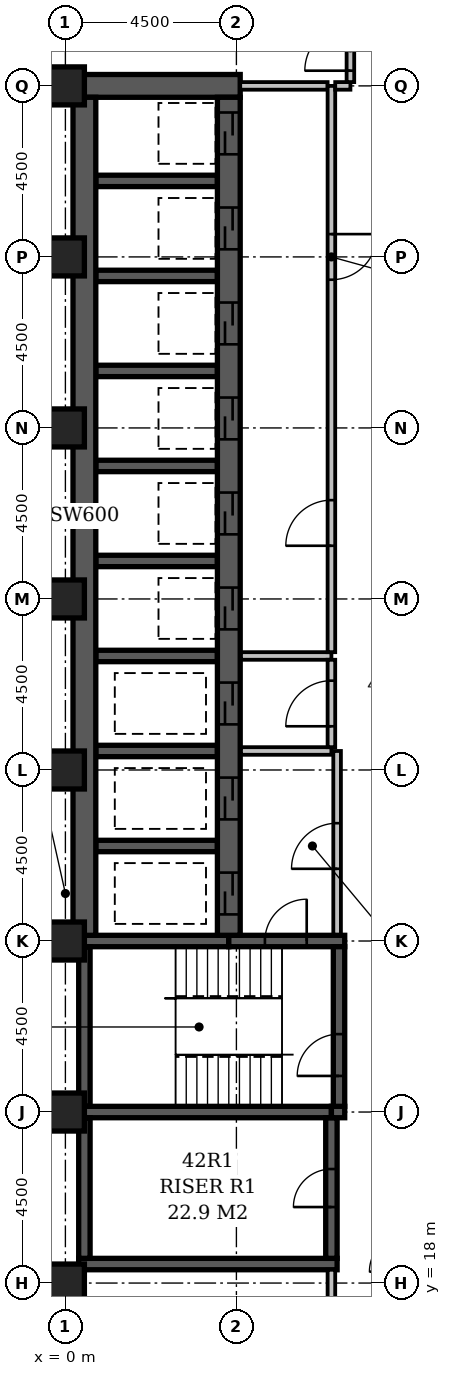
"""IFC4 building model, lengths in metres.
Left out: names, types, materials, properties, quantities, classifications, styles, units other than length and angle.
Written with IfcOpenShell. Run it as: python <this file> out.ifc"""

import sys

from ifc_helpers import new_model, si_unit, direction, frame, frame_2d, origin, origin_2d, place, context, subcontext, project, spatial, rectangle, extrude, element, fill, save


model = new_model("IFC4")
c1 = context("Model", 3, precision=1e-05, world=origin(), true_north=direction((0.0, 1.0)))
c2 = subcontext(c1, "Body", "Model", "MODEL_VIEW")
j1 = project(units=[si_unit("LENGTHUNIT", "METRE"), si_unit("PLANEANGLEUNIT", "RADIAN")], contexts=[c1])
p1 = place(None, origin())
s1 = spatial("IfcSite", under=j1, at=p1, CompositionType="ELEMENT")
p2 = place(p1, origin())
s2 = spatial("IfcBuilding", under=s1, at=p2, CompositionType="ELEMENT")
p3 = place(p2, frame((0.0, 0.0, 166.4)))
s3 = spatial("IfcBuildingStorey", under=s2, at=p3, CompositionType="ELEMENT", Elevation=166.4)
p4 = place(p3, frame((0.2, 49.5, -0.3), z_axis=(0.0, 0.0, 1.0), x_axis=(1.0, 0.0, 0.0)))
e1 = element("IfcWall", 1, at=p4, inside=s3, PredefinedType="SHEAR", context=c2, shape_type="SweptSolid", body=[
    extrude(rectangle(XDim=4.4, YDim=0.6, at=frame_2d((2.2, 0.0))), origin(), (0.0, 0.0, 1.0), 3.6),
])
p5 = place(p3, frame((0.35, 18.5, -0.3), z_axis=(0.0, 0.0, 1.0), x_axis=(1.0, 0.0, 0.0)))
e2 = element("IfcWall", 2, at=p5, inside=s3, PredefinedType="SHEAR", context=c2, shape_type="SweptSolid", body=[
    extrude(rectangle(XDim=6.8, YDim=0.3, at=frame_2d((3.4, 0.0))), origin(), (0.0, 0.0, 1.0), 3.6),
])
p6 = place(p3, frame((0.35, 22.5, -0.3), z_axis=(0.0, 0.0, 1.0), x_axis=(1.0, 0.0, 0.0)))
e3 = element("IfcWall", 3, at=p6, inside=s3, PredefinedType="SHEAR", context=c2, shape_type="SweptSolid", body=[
    extrude(rectangle(XDim=6.65, YDim=0.3, at=frame_2d((3.325, 0.0))), origin(), (0.0, 0.0, 1.0), 3.6),
])
p7 = place(p3, frame((0.35, 27.0, -0.3), z_axis=(0.0, 0.0, 1.0), x_axis=(1.0, 0.0, 0.0)))
e4 = element("IfcWall", 4, at=p7, inside=s3, PredefinedType="SHEAR", context=c2, shape_type="SweptSolid", body=[
    extrude(rectangle(XDim=3.95, YDim=0.3, at=frame_2d((1.975, 0.0))), origin(), (0.0, 0.0, 1.0), 3.6),
])
p8 = place(p3, frame((0.5, 18.65, -0.3), z_axis=(0.0, 0.0, 1.0), x_axis=(0.0, 1.0, 0.0)))
e5 = element("IfcWall", 5, at=p8, inside=s3, PredefinedType="SHEAR", context=c2, shape_type="SweptSolid", body=[
    extrude(rectangle(XDim=3.7, YDim=0.3, at=frame_2d((1.85, 0.0))), origin(), (0.0, 0.0, 1.0), 3.6),
])
p9 = place(p3, frame((0.5, 22.65, -0.3), z_axis=(0.0, 0.0, 1.0), x_axis=(0.0, 1.0, 0.0)))
e6 = element("IfcWall", 6, at=p9, inside=s3, PredefinedType="SHEAR", context=c2, shape_type="SweptSolid", body=[
    extrude(rectangle(XDim=4.2, YDim=0.3, at=frame_2d((2.1, 0.0))), origin(), (0.0, 0.0, 1.0), 3.6),
])
p10 = place(p3, frame((0.5, 27.15, -0.3), z_axis=(0.0, 0.0, 1.0), x_axis=(0.0, 1.0, 0.0)))
e7 = element("IfcWall", 7, at=p10, inside=s3, PredefinedType="SHEAR", context=c2, shape_type="SweptSolid", body=[
    extrude(rectangle(XDim=22.05, YDim=0.6, at=frame_2d((11.025, 0.0))), origin(), (0.0, 0.0, 1.0), 3.6),
])
for number, where, z_axis, x_axis in (
    (8, (0.8, 29.5, -0.3), (0.0, 0.0, 1.0), (1.0, 0.0, 0.0)),
    (9, (0.8, 32.0, -0.3), (0.0, 0.0, 1.0), (1.0, 0.0, 0.0)),
    (10, (0.8, 34.5, -0.3), (0.0, 0.0, 1.0), (1.0, 0.0, 0.0)),
    (11, (0.8, 37.0, -0.3), (0.0, 0.0, 1.0), (1.0, 0.0, 0.0)),
    (12, (0.8, 39.5, -0.3), (0.0, 0.0, 1.0), (1.0, 0.0, 0.0)),
    (13, (0.8, 42.0, -0.3), (0.0, 0.0, 1.0), (1.0, 0.0, 0.0)),
    (14, (0.8, 44.5, -0.3), (0.0, 0.0, 1.0), (1.0, 0.0, 0.0)),
    (15, (0.8, 47.0, -0.3), (0.0, 0.0, 1.0), (1.0, 0.0, 0.0)),
):
    element("IfcWall", number, at=place(p3, frame(where, z_axis=z_axis, x_axis=x_axis)), inside=s3, PredefinedType="SHEAR", context=c2, shape_type="SweptSolid", body=[
        extrude(rectangle(XDim=3.2, YDim=0.3, at=frame_2d((1.6, 0.0))), origin(), (0.0, 0.0, 1.0), 3.6),
    ])
p11 = place(p3, frame((4.3, 27.0, -0.3), z_axis=(0.0, 0.0, 1.0), x_axis=(1.0, 0.0, 0.0)))
e16 = element("IfcWall", 16, at=p11, inside=s3, PredefinedType="SHEAR", context=c2, shape_type="SweptSolid", body=[
    extrude(rectangle(XDim=3.05, YDim=0.3, at=frame_2d((1.525, 0.0))), origin(), (0.0, 0.0, 1.0), 3.6),
])
p12 = place(p11, frame((0.95, 0.0, 0.3)))
e17 = element("IfcOpeningElement", 17, at=p12, cuts=e16, PredefinedType="OPENING", context=c2, shape_type="SweptSolid", body=[
    extrude(rectangle(XDim=1.1, YDim=2.1, at=frame_2d((0.55, 1.05))), frame((0.0, 0.162, 0.0), z_axis=(0.0, -1.0, 0.0), x_axis=(1.0, 0.0, 0.0)), (0.0, 0.0, 1.0), 0.324),
])
p13 = place(p3, frame((4.3, 27.15, -0.3), z_axis=(0.0, 0.0, 1.0), x_axis=(0.0, 1.0, 0.0)))
e18 = element("IfcWall", 18, at=p13, inside=s3, PredefinedType="SHEAR", context=c2, shape_type="SweptSolid", body=[
    extrude(rectangle(XDim=22.05, YDim=0.6, at=frame_2d((11.025, 0.0))), origin(), (0.0, 0.0, 1.0), 3.6),
])
p14 = place(p13, frame((3.05, 0.0, 0.3)))
e19 = element("IfcOpeningElement", 19, at=p14, cuts=e18, PredefinedType="OPENING", context=c2, shape_type="SweptSolid", body=[
    extrude(rectangle(XDim=1.1, YDim=2.1, at=frame_2d((0.55, 1.05))), frame((0.0, 0.312, 0.0), z_axis=(0.0, -1.0, 0.0), x_axis=(1.0, 0.0, 0.0)), (0.0, 0.0, 1.0), 0.624),
])
p15 = place(p13, frame((0.55, 0.0, 0.3)))
e20 = element("IfcOpeningElement", 20, at=p15, cuts=e18, PredefinedType="OPENING", context=c2, shape_type="SweptSolid", body=[
    extrude(rectangle(XDim=1.1, YDim=2.1, at=frame_2d((0.55, 1.05))), frame((0.0, 0.312, 0.0), z_axis=(0.0, -1.0, 0.0), x_axis=(1.0, 0.0, 0.0)), (0.0, 0.0, 1.0), 0.624),
])
p16 = place(p13, frame((20.55, 0.0, 0.3)))
e21 = element("IfcOpeningElement", 21, at=p16, cuts=e18, PredefinedType="OPENING", context=c2, shape_type="SweptSolid", body=[
    extrude(rectangle(XDim=1.1, YDim=2.1, at=frame_2d((0.55, 1.05))), frame((0.0, 0.312, 0.0), z_axis=(0.0, -1.0, 0.0), x_axis=(1.0, 0.0, 0.0)), (0.0, 0.0, 1.0), 0.624),
])
p17 = place(p13, frame((18.05, 0.0, 0.3)))
e22 = element("IfcOpeningElement", 22, at=p17, cuts=e18, PredefinedType="OPENING", context=c2, shape_type="SweptSolid", body=[
    extrude(rectangle(XDim=1.1, YDim=2.1, at=frame_2d((0.55, 1.05))), frame((0.0, 0.312, 0.0), z_axis=(0.0, -1.0, 0.0), x_axis=(1.0, 0.0, 0.0)), (0.0, 0.0, 1.0), 0.624),
])
p18 = place(p13, frame((15.55, 0.0, 0.3)))
e23 = element("IfcOpeningElement", 23, at=p18, cuts=e18, PredefinedType="OPENING", context=c2, shape_type="SweptSolid", body=[
    extrude(rectangle(XDim=1.1, YDim=2.1, at=frame_2d((0.55, 1.05))), frame((0.0, 0.312, 0.0), z_axis=(0.0, -1.0, 0.0), x_axis=(1.0, 0.0, 0.0)), (0.0, 0.0, 1.0), 0.624),
])
p19 = place(p13, frame((13.05, 0.0, 0.3)))
e24 = element("IfcOpeningElement", 24, at=p19, cuts=e18, PredefinedType="OPENING", context=c2, shape_type="SweptSolid", body=[
    extrude(rectangle(XDim=1.1, YDim=2.1, at=frame_2d((0.55, 1.05))), frame((0.0, 0.312, 0.0), z_axis=(0.0, -1.0, 0.0), x_axis=(1.0, 0.0, 0.0)), (0.0, 0.0, 1.0), 0.624),
])
p20 = place(p13, frame((10.55, 0.0, 0.3)))
e25 = element("IfcOpeningElement", 25, at=p20, cuts=e18, PredefinedType="OPENING", context=c2, shape_type="SweptSolid", body=[
    extrude(rectangle(XDim=1.1, YDim=2.1, at=frame_2d((0.55, 1.05))), frame((0.0, 0.312, 0.0), z_axis=(0.0, -1.0, 0.0), x_axis=(1.0, 0.0, 0.0)), (0.0, 0.0, 1.0), 0.624),
])
p21 = place(p13, frame((8.05, 0.0, 0.3)))
e26 = element("IfcOpeningElement", 26, at=p21, cuts=e18, PredefinedType="OPENING", context=c2, shape_type="SweptSolid", body=[
    extrude(rectangle(XDim=1.1, YDim=2.1, at=frame_2d((0.55, 1.05))), frame((0.0, 0.312, 0.0), z_axis=(0.0, -1.0, 0.0), x_axis=(1.0, 0.0, 0.0)), (0.0, 0.0, 1.0), 0.624),
])
p22 = place(p13, frame((5.55, 0.0, 0.3)))
e27 = element("IfcOpeningElement", 27, at=p22, cuts=e18, PredefinedType="OPENING", context=c2, shape_type="SweptSolid", body=[
    extrude(rectangle(XDim=1.1, YDim=2.1, at=frame_2d((0.55, 1.05))), frame((0.0, 0.312, 0.0), z_axis=(0.0, -1.0, 0.0), x_axis=(1.0, 0.0, 0.0)), (0.0, 0.0, 1.0), 0.624),
])
p23 = place(p3, frame((7.0, 18.65, -0.3), z_axis=(0.0, 0.0, 1.0), x_axis=(0.0, 1.0, 0.0)))
e28 = element("IfcWall", 28, at=p23, inside=s3, PredefinedType="SHEAR", context=c2, shape_type="SweptSolid", body=[
    extrude(rectangle(XDim=3.7, YDim=0.3, at=frame_2d((1.85, 0.0))), origin(), (0.0, 0.0, 1.0), 3.6),
])
p24 = place(p23, frame((1.35, 0.0, 0.3)))
e29 = element("IfcOpeningElement", 29, at=p24, cuts=e28, PredefinedType="OPENING", context=c2, shape_type="SweptSolid", body=[
    extrude(rectangle(XDim=1.0, YDim=2.1, at=frame_2d((0.5, 1.05))), frame((0.0, 0.162, 0.0), z_axis=(0.0, -1.0, 0.0), x_axis=(1.0, 0.0, 0.0)), (0.0, 0.0, 1.0), 0.324),
])
p25 = place(p3, frame((7.0, 22.5, -0.3), z_axis=(0.0, 0.0, 1.0), x_axis=(1.0, 0.0, 0.0)))
e30 = element("IfcWall", 30, at=p25, inside=s3, PredefinedType="SHEAR", context=c2, shape_type="SweptSolid", body=[
    extrude(rectangle(XDim=0.35, YDim=0.3, at=frame_2d((0.175, 0.0))), origin(), (0.0, 0.0, 1.0), 3.6),
])
p26 = place(p3, frame((7.2, 22.65, -0.3), z_axis=(0.0, 0.0, 1.0), x_axis=(0.0, 1.0, 0.0)))
e31 = element("IfcWall", 31, at=p26, inside=s3, PredefinedType="SHEAR", context=c2, shape_type="SweptSolid", body=[
    extrude(rectangle(XDim=4.2, YDim=0.3, at=frame_2d((2.1, 0.0))), origin(), (0.0, 0.0, 1.0), 3.6),
])
p27 = place(p26, frame((0.8, 0.0, 0.3)))
e32 = element("IfcOpeningElement", 32, at=p27, cuts=e31, PredefinedType="OPENING", context=c2, shape_type="SweptSolid", body=[
    extrude(rectangle(XDim=1.1, YDim=2.1, at=frame_2d((0.55, 1.05))), frame((0.0, 0.162, 0.0), z_axis=(0.0, -1.0, 0.0), x_axis=(1.0, 0.0, 0.0)), (0.0, 0.0, 1.0), 0.324),
])
for number, where, z_axis, x_axis in (
    (33, (0.0, 18.0, -0.3), (0.0, 0.0, 1.0), (1.0, 0.0, 0.0)),
    (34, (0.0, 22.5, -0.3), (0.0, 0.0, 1.0), (1.0, 0.0, 0.0)),
    (35, (0.0, 27.0, -0.3), (0.0, 0.0, 1.0), (1.0, 0.0, 0.0)),
    (36, (0.0, 31.5, -0.3), (0.0, 0.0, 1.0), (1.0, 0.0, 0.0)),
    (37, (0.0, 36.0, -0.3), (0.0, 0.0, 1.0), (1.0, 0.0, 0.0)),
    (38, (0.0, 40.5, -0.3), (0.0, 0.0, 1.0), (1.0, 0.0, 0.0)),
    (39, (0.0, 45.0, -0.3), (0.0, 0.0, 1.0), (1.0, 0.0, 0.0)),
    (40, (0.0, 49.5, -0.3), (0.0, 0.0, 1.0), (1.0, 0.0, 0.0)),
):
    element("IfcColumn", number, at=place(p3, frame(where, z_axis=z_axis, x_axis=x_axis)), inside=s3, PredefinedType="COLUMN", context=c2, shape_type="SweptSolid", body=[
        extrude(rectangle(XDim=1.0, YDim=1.0, at=origin_2d()), origin(), (0.0, 0.0, 1.0), 3.6),
    ])
p28 = place(p3, frame((4.62, 34.5, 0.0), z_axis=(0.0, 0.0, 1.0), x_axis=(1.0, 0.0, 0.0)))
e41 = element("IfcWall", 41, at=p28, inside=s3, PredefinedType="PARTITIONING", context=c2, shape_type="SweptSolid", body=[
    extrude(rectangle(XDim=2.38, YDim=0.2, at=frame_2d((1.19, 0.0))), origin(), (0.0, 0.0, 1.0), 3.3),
])
p29 = place(p3, frame((7.0, 34.6, 0.0), z_axis=(0.0, 0.0, 1.0), x_axis=(0.0, 1.0, 0.0)))
e42 = element("IfcWall", 42, at=p29, inside=s3, PredefinedType="PARTITIONING", context=c2, shape_type="SweptSolid", body=[
    extrude(rectangle(XDim=14.9, YDim=0.2, at=frame_2d((7.45, 0.0))), origin(), (0.0, 0.0, 1.0), 3.3),
])
p30 = place(p29, frame((2.8, 0.0, 0.0)))
e43 = element("IfcOpeningElement", 43, at=p30, cuts=e42, PredefinedType="OPENING", context=c2, shape_type="SweptSolid", body=[
    extrude(rectangle(XDim=1.2, YDim=2.1, at=frame_2d((0.6, 1.05))), frame((0.0, 0.112, 0.0), z_axis=(0.0, -1.0, 0.0), x_axis=(1.0, 0.0, 0.0)), (0.0, 0.0, 1.0), 0.224),
])
p31 = place(p29, frame((9.8, 0.0, 0.0)))
e44 = element("IfcOpeningElement", 44, at=p31, cuts=e42, PredefinedType="OPENING", context=c2, shape_type="SweptSolid", body=[
    extrude(rectangle(XDim=1.2, YDim=2.1, at=frame_2d((0.6, 1.05))), frame((0.0, 0.112, 0.0), z_axis=(0.0, -1.0, 0.0), x_axis=(1.0, 0.0, 0.0)), (0.0, 0.0, 1.0), 0.224),
])
p32 = place(p3, frame((4.6, 49.5, 0.0), z_axis=(0.0, 0.0, 1.0), x_axis=(1.0, 0.0, 0.0)))
e45 = element("IfcWall", 45, at=p32, inside=s3, PredefinedType="PARTITIONING", context=c2, shape_type="SweptSolid", body=[
    extrude(rectangle(XDim=2.3, YDim=0.2, at=frame_2d((1.15, 0.0))), origin(), (0.0, 0.0, 1.0), 3.3),
])
p33 = place(p3, frame((4.62, 32.0, 0.0), z_axis=(0.0, 0.0, 1.0), x_axis=(1.0, 0.0, 0.0)))
e46 = element("IfcWall", 46, at=p33, inside=s3, PredefinedType="PARTITIONING", context=c2, shape_type="SweptSolid", body=[
    extrude(rectangle(XDim=2.38, YDim=0.2, at=frame_2d((1.19, 0.0))), origin(), (0.0, 0.0, 1.0), 3.3),
])
p34 = place(p3, frame((7.0, 32.1, 0.0), z_axis=(0.0, 0.0, 1.0), x_axis=(0.0, 1.0, 0.0)))
e47 = element("IfcWall", 47, at=p34, inside=s3, PredefinedType="PARTITIONING", context=c2, shape_type="SweptSolid", body=[
    extrude(rectangle(XDim=2.3, YDim=0.2, at=frame_2d((1.15, 0.0))), origin(), (0.0, 0.0, 1.0), 3.3),
])
p35 = place(p34, frame((0.55, 0.0, 0.0)))
e48 = element("IfcOpeningElement", 48, at=p35, cuts=e47, PredefinedType="OPENING", context=c2, shape_type="SweptSolid", body=[
    extrude(rectangle(XDim=1.2, YDim=2.1, at=frame_2d((0.6, 1.05))), frame((0.0, 0.112, 0.0), z_axis=(0.0, -1.0, 0.0), x_axis=(1.0, 0.0, 0.0)), (0.0, 0.0, 1.0), 0.224),
])
p36 = place(p3, frame((7.15, 27.17, 0.0), z_axis=(0.0, 0.0, 1.0), x_axis=(0.0, 1.0, 0.0)))
e49 = element("IfcWall", 49, at=p36, inside=s3, PredefinedType="PARTITIONING", context=c2, shape_type="SweptSolid", body=[
    extrude(rectangle(XDim=4.83, YDim=0.2, at=frame_2d((2.415, 0.0))), origin(), (0.0, 0.0, 1.0), 3.3),
])
p37 = place(p36, frame((1.73, 0.0, 0.0)))
e50 = element("IfcOpeningElement", 50, at=p37, cuts=e49, PredefinedType="OPENING", context=c2, shape_type="SweptSolid", body=[
    extrude(rectangle(XDim=1.2, YDim=2.1, at=frame_2d((0.6, 1.05))), frame((0.0, 0.112, 0.0), z_axis=(0.0, -1.0, 0.0), x_axis=(1.0, 0.0, 0.0)), (0.0, 0.0, 1.0), 0.224),
])
p38 = place(p3, frame((7.1, 49.5, 0.0), z_axis=(0.0, 0.0, 1.0), x_axis=(1.0, 0.0, 0.0)))
e51 = element("IfcWall", 51, at=p38, inside=s3, PredefinedType="PARTITIONING", context=c2, shape_type="SweptSolid", body=[
    extrude(rectangle(XDim=0.4, YDim=0.2, at=frame_2d((0.2, 0.0))), origin(), (0.0, 0.0, 1.0), 3.3),
])
p39 = place(p3, frame((7.5, 49.6, 0.0), z_axis=(0.0, 0.0, 1.0), x_axis=(0.0, 1.0, 0.0)))
e52 = element("IfcWall", 52, at=p39, inside=s3, PredefinedType="PARTITIONING", context=c2, shape_type="SweptSolid", body=[
    extrude(rectangle(XDim=3.9, YDim=0.2, at=frame_2d((1.95, 0.0))), origin(), (0.0, 0.0, 1.0), 3.3),
])
p40 = place(p39, frame((0.3, 0.0, 0.0)))
e53 = element("IfcOpeningElement", 53, at=p40, cuts=e52, PredefinedType="OPENING", context=c2, shape_type="SweptSolid", body=[
    extrude(rectangle(XDim=1.2, YDim=2.1, at=frame_2d((0.6, 1.05))), frame((0.0, 0.112, 0.0), z_axis=(0.0, -1.0, 0.0), x_axis=(1.0, 0.0, 0.0)), (0.0, 0.0, 1.0), 0.224),
])
p41 = place(p3, frame((7.0, 14.15, 0.0), z_axis=(0.0, 0.0, 1.0), x_axis=(0.0, 1.0, 0.0)))
e54 = element("IfcWall", 54, at=p41, inside=s3, PredefinedType="PARTITIONING", context=c2, shape_type="SweptSolid", body=[
    extrude(rectangle(XDim=4.2, YDim=0.2, at=frame_2d((2.1, 0.0))), origin(), (0.0, 0.0, 1.0), 3.3),
])
p42 = place(p41, frame((1.65, 0.0, 0.0)))
e55 = element("IfcOpeningElement", 55, at=p42, cuts=e54, PredefinedType="OPENING", context=c2, shape_type="SweptSolid", body=[
    extrude(rectangle(XDim=0.9, YDim=2.1, at=frame_2d((0.45, 1.05))), frame((0.0, 0.112, 0.0), z_axis=(0.0, -1.0, 0.0), x_axis=(1.0, 0.0, 0.0)), (0.0, 0.0, 1.0), 0.224),
])
p43 = place(p40, origin())
e56 = element("IfcDoor", 56, at=p43, inside=s3, OperationType="SINGLE_SWING_LEFT", PredefinedType="DOOR", context=c2, shape_type="SweptSolid", body=[
    extrude(rectangle(XDim=1.2, YDim=2.1, at=frame_2d((0.6, 1.05))), frame((0.0, 0.025, 0.0), z_axis=(0.0, -1.0, 0.0), x_axis=(1.0, 0.0, 0.0)), (0.0, 0.0, 1.0), 0.05),
])
fill(e53, e56)
p44 = place(p37, origin())
e57 = element("IfcDoor", 57, at=p44, inside=s3, OperationType="SINGLE_SWING_LEFT", PredefinedType="DOOR", context=c2, shape_type="SweptSolid", body=[
    extrude(rectangle(XDim=1.2, YDim=2.1, at=frame_2d((0.6, 1.05))), frame((0.0, 0.025, 0.0), z_axis=(0.0, -1.0, 0.0), x_axis=(1.0, 0.0, 0.0)), (0.0, 0.0, 1.0), 0.05),
])
fill(e50, e57)
p45 = place(p14, origin())
e58 = element("IfcDoor", 58, at=p45, inside=s3, OperationType="SLIDING_TO_LEFT", PredefinedType="DOOR", context=c2, shape_type="SweptSolid", body=[
    extrude(rectangle(XDim=1.1, YDim=2.1, at=frame_2d((0.55, 1.05))), frame((0.0, 0.025, 0.0), z_axis=(0.0, -1.0, 0.0), x_axis=(1.0, 0.0, 0.0)), (0.0, 0.0, 1.0), 0.05),
])
fill(e19, e58)
p46 = place(p15, origin())
e59 = element("IfcDoor", 59, at=p46, inside=s3, OperationType="SLIDING_TO_LEFT", PredefinedType="DOOR", context=c2, shape_type="SweptSolid", body=[
    extrude(rectangle(XDim=1.1, YDim=2.1, at=frame_2d((0.55, 1.05))), frame((0.0, 0.025, 0.0), z_axis=(0.0, -1.0, 0.0), x_axis=(1.0, 0.0, 0.0)), (0.0, 0.0, 1.0), 0.05),
])
fill(e20, e59)
p47 = place(p16, origin())
e60 = element("IfcDoor", 60, at=p47, inside=s3, OperationType="SLIDING_TO_LEFT", PredefinedType="DOOR", context=c2, shape_type="SweptSolid", body=[
    extrude(rectangle(XDim=1.1, YDim=2.1, at=frame_2d((0.55, 1.05))), frame((0.0, 0.025, 0.0), z_axis=(0.0, -1.0, 0.0), x_axis=(1.0, 0.0, 0.0)), (0.0, 0.0, 1.0), 0.05),
])
fill(e21, e60)
p48 = place(p17, origin())
e61 = element("IfcDoor", 61, at=p48, inside=s3, OperationType="SLIDING_TO_LEFT", PredefinedType="DOOR", context=c2, shape_type="SweptSolid", body=[
    extrude(rectangle(XDim=1.1, YDim=2.1, at=frame_2d((0.55, 1.05))), frame((0.0, 0.025, 0.0), z_axis=(0.0, -1.0, 0.0), x_axis=(1.0, 0.0, 0.0)), (0.0, 0.0, 1.0), 0.05),
])
fill(e22, e61)
p49 = place(p18, origin())
e62 = element("IfcDoor", 62, at=p49, inside=s3, OperationType="SLIDING_TO_LEFT", PredefinedType="DOOR", context=c2, shape_type="SweptSolid", body=[
    extrude(rectangle(XDim=1.1, YDim=2.1, at=frame_2d((0.55, 1.05))), frame((0.0, 0.025, 0.0), z_axis=(0.0, -1.0, 0.0), x_axis=(1.0, 0.0, 0.0)), (0.0, 0.0, 1.0), 0.05),
])
fill(e23, e62)
p50 = place(p19, origin())
e63 = element("IfcDoor", 63, at=p50, inside=s3, OperationType="SLIDING_TO_LEFT", PredefinedType="DOOR", context=c2, shape_type="SweptSolid", body=[
    extrude(rectangle(XDim=1.1, YDim=2.1, at=frame_2d((0.55, 1.05))), frame((0.0, 0.025, 0.0), z_axis=(0.0, -1.0, 0.0), x_axis=(1.0, 0.0, 0.0)), (0.0, 0.0, 1.0), 0.05),
])
fill(e24, e63)
p51 = place(p20, origin())
e64 = element("IfcDoor", 64, at=p51, inside=s3, OperationType="SLIDING_TO_LEFT", PredefinedType="DOOR", context=c2, shape_type="SweptSolid", body=[
    extrude(rectangle(XDim=1.1, YDim=2.1, at=frame_2d((0.55, 1.05))), frame((0.0, 0.025, 0.0), z_axis=(0.0, -1.0, 0.0), x_axis=(1.0, 0.0, 0.0)), (0.0, 0.0, 1.0), 0.05),
])
fill(e25, e64)
p52 = place(p21, origin())
e65 = element("IfcDoor", 65, at=p52, inside=s3, OperationType="SLIDING_TO_LEFT", PredefinedType="DOOR", context=c2, shape_type="SweptSolid", body=[
    extrude(rectangle(XDim=1.1, YDim=2.1, at=frame_2d((0.55, 1.05))), frame((0.0, 0.025, 0.0), z_axis=(0.0, -1.0, 0.0), x_axis=(1.0, 0.0, 0.0)), (0.0, 0.0, 1.0), 0.05),
])
fill(e26, e65)
p53 = place(p30, origin())
e66 = element("IfcDoor", 66, at=p53, inside=s3, OperationType="SINGLE_SWING_LEFT", PredefinedType="DOOR", context=c2, shape_type="SweptSolid", body=[
    extrude(rectangle(XDim=1.2, YDim=2.1, at=frame_2d((0.6, 1.05))), frame((0.0, 0.025, 0.0), z_axis=(0.0, -1.0, 0.0), x_axis=(1.0, 0.0, 0.0)), (0.0, 0.0, 1.0), 0.05),
])
fill(e43, e66)
p54 = place(p31, origin())
e67 = element("IfcDoor", 67, at=p54, inside=s3, OperationType="SINGLE_SWING_RIGHT", PredefinedType="DOOR", context=c2, shape_type="SweptSolid", body=[
    extrude(rectangle(XDim=1.2, YDim=2.1, at=frame_2d((0.6, 1.05))), frame((0.0, 0.025, 0.0), z_axis=(0.0, -1.0, 0.0), x_axis=(1.0, 0.0, 0.0)), (0.0, 0.0, 1.0), 0.05),
])
fill(e44, e67)
p55 = place(p35, origin())
e68 = element("IfcDoor", 68, at=p55, inside=s3, OperationType="SINGLE_SWING_LEFT", PredefinedType="DOOR", context=c2, shape_type="SweptSolid", body=[
    extrude(rectangle(XDim=1.2, YDim=2.1, at=frame_2d((0.6, 1.05))), frame((0.0, 0.025, 0.0), z_axis=(0.0, -1.0, 0.0), x_axis=(1.0, 0.0, 0.0)), (0.0, 0.0, 1.0), 0.05),
])
fill(e48, e68)
p56 = place(p22, origin())
e69 = element("IfcDoor", 69, at=p56, inside=s3, OperationType="SLIDING_TO_LEFT", PredefinedType="DOOR", context=c2, shape_type="SweptSolid", body=[
    extrude(rectangle(XDim=1.1, YDim=2.1, at=frame_2d((0.55, 1.05))), frame((0.0, 0.025, 0.0), z_axis=(0.0, -1.0, 0.0), x_axis=(1.0, 0.0, 0.0)), (0.0, 0.0, 1.0), 0.05),
])
fill(e27, e69)
p57 = place(p24, origin())
e70 = element("IfcDoor", 70, at=p57, inside=s3, OperationType="SINGLE_SWING_LEFT", PredefinedType="DOOR", context=c2, shape_type="SweptSolid", body=[
    extrude(rectangle(XDim=1.0, YDim=2.1, at=frame_2d((0.5, 1.05))), frame((0.0, 0.025, 0.0), z_axis=(0.0, -1.0, 0.0), x_axis=(1.0, 0.0, 0.0)), (0.0, 0.0, 1.0), 0.05),
])
fill(e29, e70)
p58 = place(p12, frame((1.1, 0.0, 0.0), z_axis=(0.0, 0.0, 1.0), x_axis=(-1.0, 0.0, 0.0)))
e71 = element("IfcDoor", 71, at=p58, inside=s3, OperationType="SINGLE_SWING_LEFT", PredefinedType="DOOR", context=c2, shape_type="SweptSolid", body=[
    extrude(rectangle(XDim=1.1, YDim=2.1, at=frame_2d((0.55, 1.05))), frame((0.0, 0.025, 0.0), z_axis=(0.0, -1.0, 0.0), x_axis=(1.0, 0.0, 0.0)), (0.0, 0.0, 1.0), 0.05),
])
fill(e17, e71)
p59 = place(p27, origin())
e72 = element("IfcDoor", 72, at=p59, inside=s3, OperationType="SINGLE_SWING_LEFT", PredefinedType="DOOR", context=c2, shape_type="SweptSolid", body=[
    extrude(rectangle(XDim=1.1, YDim=2.1, at=frame_2d((0.55, 1.05))), frame((0.0, 0.025, 0.0), z_axis=(0.0, -1.0, 0.0), x_axis=(1.0, 0.0, 0.0)), (0.0, 0.0, 1.0), 0.05),
])
fill(e32, e72)
save(model, sys.argv[1])
